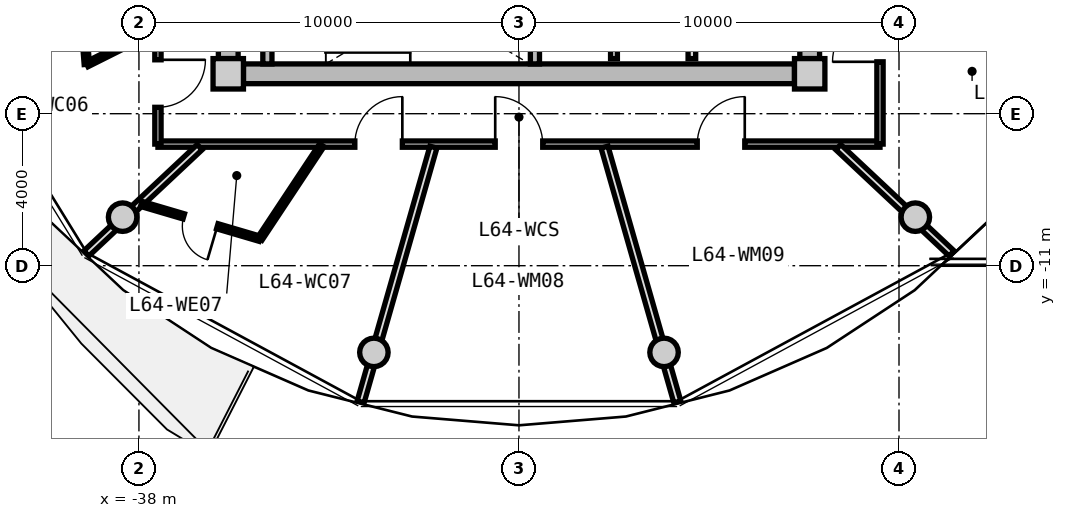
"""IFC4 building model, lengths in metres.
Left out: names, types, materials, properties, quantities, classifications, styles, units other than length and angle.
Written with IfcOpenShell. Run it as: python <this file> out.ifc"""

import sys

from ifc_helpers import new_model, si_unit, direction, frame, frame_2d, origin, origin_2d, place, context, subcontext, project, spatial, rectangle, circle, extrude, source, transform, mapped, element, fill, save


model = new_model("IFC4")
c1 = context("Model", 3, precision=1e-05, world=origin(), true_north=direction((0.0, 1.0)))
c2 = subcontext(c1, "Body", "Model", "MODEL_VIEW")
j1 = project(units=[si_unit("LENGTHUNIT", "METRE"), si_unit("PLANEANGLEUNIT", "RADIAN")], contexts=[c1])
p1 = place(None, origin())
s1 = spatial("IfcSite", under=j1, at=p1, CompositionType="ELEMENT")
p2 = place(p1, origin())
s2 = spatial("IfcBuilding", under=s1, at=p2, CompositionType="ELEMENT")
p3 = place(p2, frame((0.0, 0.0, 207.8)))
s3 = spatial("IfcBuildingStorey", under=s2, at=p3, CompositionType="ELEMENT", Elevation=207.8)
m1 = source(origin(), c2, "Body", "SweptSolid", [
    extrude(rectangle(XDim=0.8, YDim=0.8, at=origin_2d()), origin(), (0.0, 0.0, 1.0), 3.05),
])
for number, where, z_axis, x_axis in (
    (1, (-35.65, -5.95, 0.0), (0.0, 0.0, 1.0), (1.0, 0.0, 0.0)),
    (2, (-20.35, -5.95, 0.0), (0.0, 0.0, 1.0), (1.0, 0.0, 0.0)),
):
    element("IfcColumn", number, at=place(p3, frame(where, z_axis=z_axis, x_axis=x_axis)), inside=s3, PredefinedType="COLUMN", context=c2, shape_type="MappedRepresentation", body=[
        mapped(m1, transform((0.0, 0.0, 0.0), x_axis=(1.0, 0.0, 0.0), y_axis=(0.0, 1.0, 0.0), z_axis=(0.0, 0.0, 1.0), scale=1.0)),
    ])
m2 = source(origin(), c2, "Body", "SweptSolid", [
    extrude(rectangle(XDim=14.5, YDim=0.52, at=frame_2d((7.25, 0.0))), origin(), (0.0, 0.0, 1.0), 2.76),
])
p4 = place(p3, frame((-20.75, -5.95, 0.0), z_axis=(0.0, 0.0, 1.0), x_axis=(-1.0, 0.0, 0.0)))
e3 = element("IfcWall", 3, at=p4, inside=s3, PredefinedType="SHEAR", context=c2, shape_type="MappedRepresentation", body=[
    mapped(m2, transform((0.0, 0.0, 0.0), x_axis=(1.0, 0.0, 0.0), y_axis=(0.0, 1.0, 0.0), z_axis=(0.0, 0.0, 1.0), scale=1.0)),
])
m3 = source(origin(), c2, "Body", "SweptSolid", [
    extrude(rectangle(XDim=11.1, YDim=0.52, at=frame_2d((5.55, 0.0))), origin(), (0.0, 0.0, 1.0), 2.76),
])
p5 = place(p3, frame((-35.65, -5.55, 0.0), z_axis=(0.0, 0.0, 1.0), x_axis=(0.0, 1.0, 0.0)))
e4 = element("IfcWall", 4, at=p5, inside=s3, PredefinedType="SHEAR", context=c2, shape_type="MappedRepresentation", body=[
    mapped(m3, transform((0.0, 0.0, 0.0), x_axis=(1.0, 0.0, 0.0), y_axis=(0.0, 1.0, 0.0), z_axis=(0.0, 0.0, 1.0), scale=1.0)),
])
p6 = place(p5, frame((3.8, 0.0, 0.0)))
e5 = element("IfcOpeningElement", 5, at=p6, cuts=e4, PredefinedType="OPENING", context=c2, shape_type="SweptSolid", body=[
    extrude(rectangle(XDim=1.2, YDim=2.15, at=frame_2d((0.6, 1.075))), frame((0.0, 0.27, 0.0), z_axis=(0.0, -1.0, 0.0), x_axis=(1.0, 0.0, 0.0)), (0.0, 0.0, 1.0), 0.54),
])
p7 = place(p3, frame((-20.35, 5.55, 0.0), z_axis=(0.0, 0.0, 1.0), x_axis=(0.0, -1.0, 0.0)))
e6 = element("IfcWall", 6, at=p7, inside=s3, PredefinedType="SHEAR", context=c2, shape_type="MappedRepresentation", body=[
    mapped(m3, transform((0.0, 0.0, 0.0), x_axis=(1.0, 0.0, 0.0), y_axis=(0.0, 1.0, 0.0), z_axis=(0.0, 0.0, 1.0), scale=1.0)),
])
p8 = place(p7, frame((5.65, 0.0, 0.0)))
e7 = element("IfcOpeningElement", 7, at=p8, cuts=e6, PredefinedType="OPENING", context=c2, shape_type="SweptSolid", body=[
    extrude(rectangle(XDim=1.2, YDim=2.15, at=frame_2d((0.6, 1.075))), frame((0.0, 0.27, 0.0), z_axis=(0.0, -1.0, 0.0), x_axis=(1.0, 0.0, 0.0)), (0.0, 0.0, 1.0), 0.54),
])
p9 = place(p7, frame((9.3, 0.0, 0.0)))
e8 = element("IfcOpeningElement", 8, at=p9, cuts=e6, PredefinedType="OPENING", context=c2, shape_type="SweptSolid", body=[
    extrude(rectangle(XDim=1.0, YDim=2.1, at=frame_2d((0.5, 1.05))), frame((0.0, 0.27, 0.0), z_axis=(0.0, -1.0, 0.0), x_axis=(1.0, 0.0, 0.0)), (0.0, 0.0, 1.0), 0.54),
])
m4 = source(origin(), c2, "Body", "SweptSolid", [
    extrude(circle(Radius=0.375, at=origin_2d()), origin(), (0.0, 0.0, 1.0), 3.05),
])
for number, where, z_axis, x_axis in (
    (9, (-38.43, -9.723, 0.0), (0.0, 0.0, 1.0), (1.0, 0.0, 0.0)),
    (10, (-31.818, -13.281, 0.0), (0.0, 0.0, 1.0), (1.0, 0.0, 0.0)),
    (11, (-24.182, -13.281, 0.0), (0.0, 0.0, 1.0), (1.0, 0.0, 0.0)),
    (12, (-17.57, -9.723, 0.0), (0.0, 0.0, 1.0), (1.0, 0.0, 0.0)),
):
    element("IfcColumn", number, at=place(p3, frame(where, z_axis=z_axis, x_axis=x_axis)), inside=s3, PredefinedType="COLUMN", context=c2, shape_type="MappedRepresentation", body=[
        mapped(m4, transform((0.0, 0.0, 0.0), x_axis=(1.0, 0.0, 0.0), y_axis=(0.0, 1.0, 0.0), z_axis=(0.0, 0.0, 1.0), scale=1.0)),
    ])
m5 = source(origin(), c2, "Body", "SweptSolid", [
    extrude(rectangle(XDim=3.24, YDim=0.24, at=frame_2d((1.62, 0.0))), origin(), (0.0, 0.0, 1.0), 2.76),
])
for number, where, z_axis, x_axis in (
    (13, (-34.62, -5.69, 0.0), (0.0, 0.0, 1.0), (0.0, 1.0, 0.0)),
    (14, (-27.58, -5.69, 0.0), (0.0, 0.0, 1.0), (0.0, 1.0, 0.0)),
):
    element("IfcWall", number, at=place(p3, frame(where, z_axis=z_axis, x_axis=x_axis)), inside=s3, PredefinedType="PARTITIONING", context=c2, shape_type="MappedRepresentation", body=[
        mapped(m5, transform((0.0, 0.0, 0.0), x_axis=(1.0, 0.0, 0.0), y_axis=(0.0, 1.0, 0.0), z_axis=(0.0, 0.0, 1.0), scale=1.0)),
    ])
m6 = source(origin(), c2, "Body", "SweptSolid", [
    extrude(rectangle(XDim=3.8, YDim=0.2, at=frame_2d((1.9, 0.0))), origin(), (0.0, 0.0, 1.0), 2.745),
])
p10 = place(p3, frame((-23.45, -5.55, 0.0), z_axis=(0.0, 0.0, 1.0), x_axis=(0.0, 1.0, 0.0)))
e15 = element("IfcWall", 15, at=p10, inside=s3, PredefinedType="PARTITIONING", context=c2, shape_type="MappedRepresentation", body=[
    mapped(m6, transform((0.0, 0.0, 0.0), x_axis=(1.0, 0.0, 0.0), y_axis=(0.0, 1.0, 0.0), z_axis=(0.0, 0.0, 1.0), scale=1.0)),
])
m7 = source(origin(), c2, "Body", "SweptSolid", [
    extrude(rectangle(XDim=4.2, YDim=0.18, at=frame_2d((2.1, 0.0))), origin(), (0.0, 0.0, 1.0), 2.745),
])
p11 = place(p3, frame((-25.5, -5.55, 0.0), z_axis=(0.0, 0.0, 1.0), x_axis=(0.0, 1.0, 0.0)))
e16 = element("IfcWall", 16, at=p11, inside=s3, PredefinedType="PARTITIONING", context=c2, shape_type="MappedRepresentation", body=[
    mapped(m7, transform((0.0, 0.0, 0.0), x_axis=(1.0, 0.0, 0.0), y_axis=(0.0, 1.0, 0.0), z_axis=(0.0, 0.0, 1.0), scale=1.0)),
])
m8 = source(origin(), c2, "Body", "SweptSolid", [
    extrude(rectangle(XDim=19.0, YDim=0.165, at=frame_2d((9.5, 0.0))), origin(), (0.0, 0.0, 1.0), 2.745),
])
p12 = place(p3, frame((-18.5, -7.8, 0.0), z_axis=(0.0, 0.0, 1.0), x_axis=(-1.0, 0.0, 0.0)))
e17 = element("IfcWall", 17, at=p12, inside=s3, PredefinedType="PARTITIONING", context=c2, shape_type="MappedRepresentation", body=[
    mapped(m8, transform((0.0, 0.0, 0.0), x_axis=(1.0, 0.0, 0.0), y_axis=(0.0, 1.0, 0.0), z_axis=(0.0, 0.0, 1.0), scale=1.0)),
])
p13 = place(p12, frame((12.569, 0.0, 0.0)))
e18 = element("IfcOpeningElement", 18, at=p13, cuts=e17, PredefinedType="OPENING", context=c2, shape_type="SweptSolid", body=[
    extrude(rectangle(XDim=1.25, YDim=2.2, at=frame_2d((0.625, 1.1))), frame((0.0, 0.093, 0.0), z_axis=(0.0, -1.0, 0.0), x_axis=(1.0, 0.0, 0.0)), (0.0, 0.0, 1.0), 0.185),
])
p14 = place(p12, frame((8.875, 0.0, 0.0)))
e19 = element("IfcOpeningElement", 19, at=p14, cuts=e17, PredefinedType="OPENING", context=c2, shape_type="SweptSolid", body=[
    extrude(rectangle(XDim=1.25, YDim=2.2, at=frame_2d((0.625, 1.1))), frame((0.0, 0.093, 0.0), z_axis=(0.0, -1.0, 0.0), x_axis=(1.0, 0.0, 0.0)), (0.0, 0.0, 1.0), 0.185),
])
p15 = place(p12, frame((3.559, 0.0, 0.0)))
e20 = element("IfcOpeningElement", 20, at=p15, cuts=e17, PredefinedType="OPENING", context=c2, shape_type="SweptSolid", body=[
    extrude(rectangle(XDim=1.25, YDim=2.2, at=frame_2d((0.625, 1.1))), frame((0.0, 0.093, 0.0), z_axis=(0.0, -1.0, 0.0), x_axis=(1.0, 0.0, 0.0)), (0.0, 0.0, 1.0), 0.185),
])
m9 = source(origin(), c2, "Body", "SweptSolid", [
    extrude(rectangle(XDim=6.88, YDim=0.165, at=frame_2d((3.44, 0.0))), origin(), (0.0, 0.0, 1.0), 2.745),
])
p16 = place(p3, frame((-37.5, -7.8, 0.0), z_axis=(0.0, 0.0, 1.0), x_axis=(0.0, 1.0, 0.0)))
e21 = element("IfcWall", 21, at=p16, inside=s3, PredefinedType="PARTITIONING", context=c2, shape_type="MappedRepresentation", body=[
    mapped(m9, transform((0.0, 0.0, 0.0), x_axis=(1.0, 0.0, 0.0), y_axis=(0.0, 1.0, 0.0), z_axis=(0.0, 0.0, 1.0), scale=1.0)),
])
p17 = place(p16, frame((0.968, 0.0, 0.0)))
e22 = element("IfcOpeningElement", 22, at=p17, cuts=e21, PredefinedType="OPENING", context=c2, shape_type="SweptSolid", body=[
    extrude(rectangle(XDim=1.25, YDim=2.2, at=frame_2d((0.625, 1.1))), frame((0.0, 0.093, 0.0), z_axis=(0.0, -1.0, 0.0), x_axis=(1.0, 0.0, 0.0)), (0.0, 0.0, 1.0), 0.185),
])
p18 = place(p3, frame((-18.5, -0.92, 0.0), z_axis=(0.0, 0.0, 1.0), x_axis=(0.0, -1.0, 0.0)))
e23 = element("IfcWall", 23, at=p18, inside=s3, PredefinedType="PARTITIONING", context=c2, shape_type="MappedRepresentation", body=[
    mapped(m9, transform((0.0, 0.0, 0.0), x_axis=(1.0, 0.0, 0.0), y_axis=(0.0, 1.0, 0.0), z_axis=(0.0, 0.0, 1.0), scale=1.0)),
])
p19 = place(p18, frame((3.464, 0.0, 0.0)))
e24 = element("IfcOpeningElement", 24, at=p19, cuts=e23, PredefinedType="OPENING", context=c2, shape_type="SweptSolid", body=[
    extrude(rectangle(XDim=1.25, YDim=2.2, at=frame_2d((0.625, 1.1))), frame((0.0, 0.093, 0.0), z_axis=(0.0, -1.0, 0.0), x_axis=(1.0, 0.0, 0.0)), (0.0, 0.0, 1.0), 0.185),
])
m10 = source(origin(), c2, "Body", "SweptSolid", [
    extrude(rectangle(XDim=4.089, YDim=0.19, at=frame_2d((2.044, 0.0))), origin(), (0.0, 0.0, 1.0), 2.345),
])
p20 = place(p3, frame((-36.402, -7.88, 0.0), z_axis=(0.0, 0.0, 1.0), x_axis=(-0.729401273609, -0.684086092577, 0.0)))
e25 = element("IfcWall", 25, at=p20, inside=s3, PredefinedType="PARTITIONING", context=c2, shape_type="MappedRepresentation", body=[
    mapped(m10, transform((0.0, 0.0, 0.0), x_axis=(1.0, 0.0, 0.0), y_axis=(0.0, 1.0, 0.0), z_axis=(0.0, 0.0, 1.0), scale=1.0)),
])
m11 = source(origin(), c2, "Body", "SweptSolid", [
    extrude(rectangle(XDim=2.06, YDim=0.14, at=frame_2d((1.03, 0.0))), origin(), (0.0, 0.0, 1.0), 2.745),
])
p21 = place(p3, frame((-37.53, -4.778, 0.0), z_axis=(0.0, 0.0, 1.0), x_axis=(-0.893952568722, -0.448161583444, 0.0)))
e26 = element("IfcWall", 26, at=p21, inside=s3, PredefinedType="PARTITIONING", context=c2, shape_type="MappedRepresentation", body=[
    mapped(m11, transform((0.0, 0.0, 0.0), x_axis=(1.0, 0.0, 0.0), y_axis=(0.0, 1.0, 0.0), z_axis=(0.0, 0.0, 1.0), scale=1.0)),
])
m12 = source(origin(), c2, "Body", "SweptSolid", [
    extrude(rectangle(XDim=2.798, YDim=0.14, at=frame_2d((1.399, 0.0))), origin(), (0.0, 0.0, 1.0), 2.745),
])
p22 = place(p3, frame((-39.371, -5.701, 0.0), z_axis=(0.0, 0.0, 1.0), x_axis=(-0.077823984089, 0.996967114553, 0.0)))
e27 = element("IfcWall", 27, at=p22, inside=s3, PredefinedType="PARTITIONING", context=c2, shape_type="MappedRepresentation", body=[
    mapped(m12, transform((0.0, 0.0, 0.0), x_axis=(1.0, 0.0, 0.0), y_axis=(0.0, 1.0, 0.0), z_axis=(0.0, 0.0, 1.0), scale=1.0)),
])
p23 = place(p22, frame((0.939, 0.0, 0.0)))
e28 = element("IfcOpeningElement", 28, at=p23, cuts=e27, PredefinedType="OPENING", context=c2, shape_type="SweptSolid", body=[
    extrude(rectangle(XDim=0.92, YDim=2.1, at=frame_2d((0.46, 1.05))), frame((0.0, 0.08, 0.0), z_axis=(0.0, -1.0, 0.0), x_axis=(1.0, 0.0, 0.0)), (0.0, 0.0, 1.0), 0.16),
])
m13 = source(origin(), c2, "Body", "SweptSolid", [
    extrude(rectangle(XDim=6.974, YDim=0.19, at=frame_2d((3.487, 0.0))), origin(), (0.0, 0.0, 1.0), 2.345),
])
p24 = place(p3, frame((-30.251, -7.88, 0.0), z_axis=(0.0, 0.0, 1.0), x_axis=(-0.274707256801, -0.961527910703, 0.0)))
e29 = element("IfcWall", 29, at=p24, inside=s3, PredefinedType="PARTITIONING", context=c2, shape_type="MappedRepresentation", body=[
    mapped(m13, transform((0.0, 0.0, 0.0), x_axis=(1.0, 0.0, 0.0), y_axis=(0.0, 1.0, 0.0), z_axis=(0.0, 0.0, 1.0), scale=1.0)),
])
m14 = source(origin(), c2, "Body", "SweptSolid", [
    extrude(rectangle(XDim=2.953, YDim=0.14, at=frame_2d((1.476, 0.0))), origin(), (0.0, 0.0, 1.0), 2.745),
])
p25 = place(p3, frame((-33.188, -7.83, 0.0), z_axis=(0.0, 0.0, 1.0), x_axis=(-0.552427436518, -0.833560991999, 0.0)))
e30 = element("IfcWall", 30, at=p25, inside=s3, PredefinedType="PARTITIONING", context=c2, shape_type="MappedRepresentation", body=[
    mapped(m14, transform((0.0, 0.0, 0.0), x_axis=(1.0, 0.0, 0.0), y_axis=(0.0, 1.0, 0.0), z_axis=(0.0, 0.0, 1.0), scale=1.0)),
])
m15 = source(origin(), c2, "Body", "SweptSolid", [
    extrude(rectangle(XDim=3.252, YDim=0.14, at=frame_2d((1.626, 0.0))), origin(), (0.0, 0.0, 1.0), 2.745),
])
p26 = place(p3, frame((-34.82, -10.291, 0.0), z_axis=(0.0, 0.0, 1.0), x_axis=(-0.959294945864, 0.282406102695, 0.0)))
e31 = element("IfcWall", 31, at=p26, inside=s3, PredefinedType="PARTITIONING", context=c2, shape_type="MappedRepresentation", body=[
    mapped(m15, transform((0.0, 0.0, 0.0), x_axis=(1.0, 0.0, 0.0), y_axis=(0.0, 1.0, 0.0), z_axis=(0.0, 0.0, 1.0), scale=1.0)),
])
p27 = place(p26, frame((1.166, 0.0, 0.0)))
e32 = element("IfcOpeningElement", 32, at=p27, cuts=e31, PredefinedType="OPENING", context=c2, shape_type="SweptSolid", body=[
    extrude(rectangle(XDim=0.92, YDim=2.1, at=frame_2d((0.46, 1.05))), frame((0.0, 0.08, 0.0), z_axis=(0.0, -1.0, 0.0), x_axis=(1.0, 0.0, 0.0)), (0.0, 0.0, 1.0), 0.16),
])
p28 = place(p3, frame((-25.749, -7.88, 0.0), z_axis=(0.0, 0.0, 1.0), x_axis=(0.274707256801, -0.961527910703, 0.0)))
e33 = element("IfcWall", 33, at=p28, inside=s3, PredefinedType="PARTITIONING", context=c2, shape_type="MappedRepresentation", body=[
    mapped(m13, transform((0.0, 0.0, 0.0), x_axis=(1.0, 0.0, 0.0), y_axis=(0.0, 1.0, 0.0), z_axis=(0.0, 0.0, 1.0), scale=1.0)),
])
p29 = place(p3, frame((-19.598, -7.88, 0.0), z_axis=(0.0, 0.0, 1.0), x_axis=(0.729401273609, -0.684086092577, 0.0)))
e34 = element("IfcWall", 34, at=p29, inside=s3, PredefinedType="PARTITIONING", context=c2, shape_type="MappedRepresentation", body=[
    mapped(m10, transform((0.0, 0.0, 0.0), x_axis=(1.0, 0.0, 0.0), y_axis=(0.0, 1.0, 0.0), z_axis=(0.0, 0.0, 1.0), scale=1.0)),
])
m16 = source(origin(), c2, "Body", "SweptSolid", [
    extrude(rectangle(XDim=1.25, YDim=2.2, at=frame_2d((0.625, 1.1))), frame((0.0, 0.025, 0.0), z_axis=(0.0, -1.0, 0.0), x_axis=(1.0, 0.0, 0.0)), (0.0, 0.0, 1.0), 0.05),
])
p30 = place(p17, frame((1.25, 0.0, 0.0), z_axis=(0.0, 0.0, 1.0), x_axis=(-1.0, 0.0, 0.0)))
e35 = element("IfcDoor", 35, at=p30, inside=s3, OperationType="SINGLE_SWING_LEFT", PredefinedType="DOOR", context=c2, shape_type="MappedRepresentation", body=[
    mapped(m16, transform((0.0, 0.0, 0.0), x_axis=(1.0, 0.0, 0.0), y_axis=(0.0, 1.0, 0.0), z_axis=(0.0, 0.0, 1.0), scale=1.0)),
])
fill(e22, e35)
p31 = place(p13, frame((1.25, 0.0, 0.0), z_axis=(0.0, 0.0, 1.0), x_axis=(-1.0, 0.0, 0.0)))
e36 = element("IfcDoor", 36, at=p31, inside=s3, OperationType="SINGLE_SWING_RIGHT", PredefinedType="DOOR", context=c2, shape_type="MappedRepresentation", body=[
    mapped(m16, transform((0.0, 0.0, 0.0), x_axis=(1.0, 0.0, 0.0), y_axis=(0.0, 1.0, 0.0), z_axis=(0.0, 0.0, 1.0), scale=1.0)),
])
fill(e18, e36)
m17 = source(origin(), c2, "Body", "SweptSolid", [
    extrude(rectangle(XDim=0.92, YDim=2.1, at=frame_2d((0.46, 1.05))), frame((0.0, 0.025, 0.0), z_axis=(0.0, -1.0, 0.0), x_axis=(1.0, 0.0, 0.0)), (0.0, 0.0, 1.0), 0.05),
])
p32 = place(p27, origin())
e37 = element("IfcDoor", 37, at=p32, inside=s3, OperationType="SINGLE_SWING_LEFT", PredefinedType="DOOR", context=c2, shape_type="MappedRepresentation", body=[
    mapped(m17, transform((0.0, 0.0, 0.0), x_axis=(1.0, 0.0, 0.0), y_axis=(0.0, 1.0, 0.0), z_axis=(0.0, 0.0, 1.0), scale=1.0)),
])
fill(e32, e37)
p33 = place(p14, frame((1.25, 0.0, 0.0), z_axis=(0.0, 0.0, 1.0), x_axis=(-1.0, 0.0, 0.0)))
e38 = element("IfcDoor", 38, at=p33, inside=s3, OperationType="SINGLE_SWING_LEFT", PredefinedType="DOOR", context=c2, shape_type="MappedRepresentation", body=[
    mapped(m16, transform((0.0, 0.0, 0.0), x_axis=(1.0, 0.0, 0.0), y_axis=(0.0, 1.0, 0.0), z_axis=(0.0, 0.0, 1.0), scale=1.0)),
])
fill(e19, e38)
p34 = place(p15, frame((1.25, 0.0, 0.0), z_axis=(0.0, 0.0, 1.0), x_axis=(-1.0, 0.0, 0.0)))
e39 = element("IfcDoor", 39, at=p34, inside=s3, OperationType="SINGLE_SWING_RIGHT", PredefinedType="DOOR", context=c2, shape_type="MappedRepresentation", body=[
    mapped(m16, transform((0.0, 0.0, 0.0), x_axis=(1.0, 0.0, 0.0), y_axis=(0.0, 1.0, 0.0), z_axis=(0.0, 0.0, 1.0), scale=1.0)),
])
fill(e20, e39)
p35 = place(p19, frame((1.25, 0.0, 0.0), z_axis=(0.0, 0.0, 1.0), x_axis=(-1.0, 0.0, 0.0)))
e40 = element("IfcDoor", 40, at=p35, inside=s3, OperationType="SINGLE_SWING_LEFT", PredefinedType="DOOR", context=c2, shape_type="MappedRepresentation", body=[
    mapped(m16, transform((0.0, 0.0, 0.0), x_axis=(1.0, 0.0, 0.0), y_axis=(0.0, 1.0, 0.0), z_axis=(0.0, 0.0, 1.0), scale=1.0)),
])
fill(e24, e40)
save(model, sys.argv[1])
